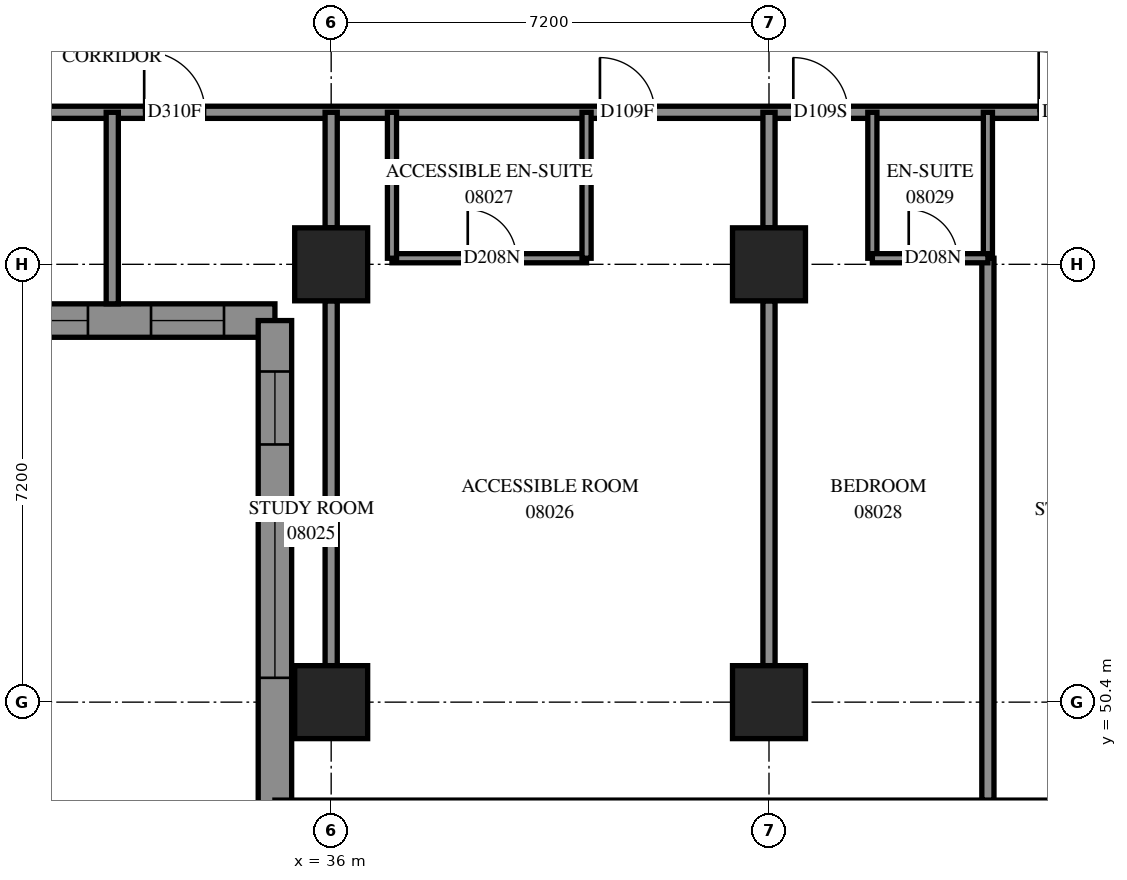
"""IFC4 building model, lengths in metres.
Left out: names, types, materials, properties, quantities, classifications, styles, units other than length and angle.
Written with IfcOpenShell. Run it as: python <this file> out.ifc"""

import sys

from ifc_helpers import new_model, si_unit, direction, frame, frame_2d, origin, origin_2d, place, context, subcontext, project, spatial, polyline, rectangle, outline, extrude, element, fill, save


model = new_model("IFC4")
c1 = context("Model", 3, precision=1e-05, world=origin(), true_north=direction((0.0, 1.0)))
c2 = subcontext(c1, "Body", "Model", "MODEL_VIEW")
j1 = project(units=[si_unit("LENGTHUNIT", "METRE"), si_unit("PLANEANGLEUNIT", "RADIAN")], contexts=[c1])
p1 = place(None, origin())
s1 = spatial("IfcSite", under=j1, at=p1, CompositionType="ELEMENT")
p2 = place(p1, origin())
s2 = spatial("IfcBuilding", under=s1, at=p2, CompositionType="ELEMENT")
p3 = place(p2, frame((0.0, 0.0, 33.8)))
s3 = spatial("IfcBuildingStorey", under=s2, at=p3, CompositionType="ELEMENT", Elevation=33.8)
for number, where, z_axis, x_axis in (
    (1, (36.0, 50.4, 0.0), (0.0, 0.0, 1.0), (1.0, 0.0, 0.0)),
    (2, (36.0, 57.6, 0.0), (0.0, 0.0, 1.0), (1.0, 0.0, 0.0)),
    (3, (43.2, 50.4, 0.0), (0.0, 0.0, 1.0), (1.0, 0.0, 0.0)),
    (4, (43.2, 57.6, 0.0), (0.0, 0.0, 1.0), (1.0, 0.0, 0.0)),
):
    element("IfcColumn", number, at=place(p3, frame(where, z_axis=z_axis, x_axis=x_axis)), inside=s3, PredefinedType="COLUMN", context=c2, shape_type="SweptSolid", body=[
        extrude(rectangle(XDim=1.2, YDim=1.2, at=origin_2d()), origin(), (0.0, 0.0, 1.0), 3.1),
    ])
p4 = place(p3, frame((27.875, 56.675, 0.0), z_axis=(0.0, 0.0, 1.0), x_axis=(1.0, 0.0, 0.0)))
e5 = element("IfcWall", 5, at=p4, inside=s3, PredefinedType="SOLIDWALL", context=c2, shape_type="SweptSolid", body=[
    extrude(outline(polyline([(-0.275, -0.275), (6.925, -0.275), (7.475, 0.275), (0.275, 0.275), (-0.275, -0.275)])), origin(), (0.0, 0.0, 1.0), 3.1),
])
p5 = place(p4, frame((1.325, 0.0, 0.5)))
e6 = element("IfcOpeningElement", 6, at=p5, cuts=e5, PredefinedType="OPENING", context=c2, shape_type="SweptSolid", body=[
    extrude(rectangle(XDim=2.8, YDim=2.45, at=frame_2d((1.4, 1.225))), frame((0.0, 0.285, 0.0), z_axis=(0.0, -1.0, 0.0), x_axis=(1.0, 0.0, 0.0)), (0.0, 0.0, 1.0), 0.57),
])
p6 = place(p4, frame((5.162, 0.0, 0.5)))
e7 = element("IfcOpeningElement", 7, at=p6, cuts=e5, PredefinedType="OPENING", context=c2, shape_type="SweptSolid", body=[
    extrude(rectangle(XDim=1.2, YDim=2.45, at=frame_2d((0.6, 1.225))), frame((0.0, 0.285, 0.0), z_axis=(0.0, -1.0, 0.0), x_axis=(1.0, 0.0, 0.0)), (0.0, 0.0, 1.0), 0.57),
])
p7 = place(p3, frame((35.075, 56.675, 0.0), z_axis=(0.0, 0.0, 1.0), x_axis=(0.0, -1.0, 0.0)))
e8 = element("IfcWall", 8, at=p7, inside=s3, PredefinedType="SOLIDWALL", context=c2, shape_type="SweptSolid", body=[
    extrude(outline(polyline([(0.275, -0.275), (8.436, -0.275), (7.886, 0.275), (-0.275, 0.275), (0.275, -0.275)])), origin(), (0.0, 0.0, 1.0), 3.1),
])
p8 = place(p7, frame((3.075, 0.0, 0.5)))
e9 = element("IfcOpeningElement", 9, at=p8, cuts=e8, PredefinedType="OPENING", context=c2, shape_type="SweptSolid", body=[
    extrude(rectangle(XDim=2.8, YDim=2.45, at=frame_2d((1.4, 1.225))), frame((0.0, 0.285, 0.0), z_axis=(0.0, -1.0, 0.0), x_axis=(1.0, 0.0, 0.0)), (0.0, 0.0, 1.0), 0.57),
])
p9 = place(p7, frame((0.838, 0.0, 0.5)))
e10 = element("IfcOpeningElement", 10, at=p9, cuts=e8, PredefinedType="OPENING", context=c2, shape_type="SweptSolid", body=[
    extrude(rectangle(XDim=1.2, YDim=2.45, at=frame_2d((0.6, 1.225))), frame((0.0, 0.285, 0.0), z_axis=(0.0, -1.0, 0.0), x_axis=(1.0, 0.0, 0.0)), (0.0, 0.0, 1.0), 0.57),
])
p10 = place(p3, frame((35.075, 48.514, 0.0), z_axis=(0.0, 0.0, 1.0), x_axis=(1.0, 0.0, 0.0)))
e11 = element("IfcWall", 11, at=p10, inside=s3, PredefinedType="SOLIDWALL", context=c2, shape_type="SweptSolid", body=[
    extrude(outline(polyline([(-0.275, -0.275), (14.125, -0.275), (14.675, 0.275), (0.275, 0.275), (-0.275, -0.275)])), origin(), (0.0, 0.0, 1.0), 3.1),
])
p11 = place(p10, frame((1.325, 0.0, 0.5)))
e12 = element("IfcOpeningElement", 12, at=p11, cuts=e11, PredefinedType="OPENING", context=c2, shape_type="SweptSolid", body=[
    extrude(rectangle(XDim=2.8, YDim=2.45, at=frame_2d((1.4, 1.225))), frame((0.0, 0.285, 0.0), z_axis=(0.0, -1.0, 0.0), x_axis=(1.0, 0.0, 0.0)), (0.0, 0.0, 1.0), 0.57),
])
p12 = place(p10, frame((4.925, 0.0, 0.5)))
e13 = element("IfcOpeningElement", 13, at=p12, cuts=e11, PredefinedType="OPENING", context=c2, shape_type="SweptSolid", body=[
    extrude(rectangle(XDim=2.8, YDim=2.45, at=frame_2d((1.4, 1.225))), frame((0.0, 0.285, 0.0), z_axis=(0.0, -1.0, 0.0), x_axis=(1.0, 0.0, 0.0)), (0.0, 0.0, 1.0), 0.57),
])
p13 = place(p10, frame((8.275, 0.0, 0.5)))
e14 = element("IfcOpeningElement", 14, at=p13, cuts=e11, PredefinedType="OPENING", context=c2, shape_type="SweptSolid", body=[
    extrude(rectangle(XDim=2.8, YDim=2.45, at=frame_2d((1.4, 1.225))), frame((0.0, 0.285, 0.0), z_axis=(0.0, -1.0, 0.0), x_axis=(1.0, 0.0, 0.0)), (0.0, 0.0, 1.0), 0.57),
])
p14 = place(p10, frame((12.363, 0.0, 0.5)))
e15 = element("IfcOpeningElement", 15, at=p14, cuts=e11, PredefinedType="OPENING", context=c2, shape_type="SweptSolid", body=[
    extrude(rectangle(XDim=1.2, YDim=2.45, at=frame_2d((0.6, 1.225))), frame((0.0, 0.285, 0.0), z_axis=(0.0, -1.0, 0.0), x_axis=(1.0, 0.0, 0.0)), (0.0, 0.0, 1.0), 0.57),
])
p15 = place(p3, frame((28.8, 60.1, 0.0), z_axis=(0.0, 0.0, 1.0), x_axis=(1.0, 0.0, 0.0)))
e16 = element("IfcWall", 16, at=p15, inside=s3, PredefinedType="PARTITIONING", context=c2, shape_type="SweptSolid", body=[
    extrude(rectangle(XDim=24.1, YDim=0.2, at=frame_2d((12.05, 0.0))), origin(), (0.0, 0.0, 1.0), 3.1),
])
p16 = place(p15, frame((4.125, 0.0, 0.0)))
e17 = element("IfcOpeningElement", 17, at=p16, cuts=e16, PredefinedType="OPENING", context=c2, shape_type="SweptSolid", body=[
    extrude(rectangle(XDim=1.0, YDim=2.1, at=frame_2d((0.5, 1.05))), frame((0.0, 0.11, 0.0), z_axis=(0.0, -1.0, 0.0), x_axis=(1.0, 0.0, 0.0)), (0.0, 0.0, 1.0), 0.22),
])
p17 = place(p15, frame((11.62, 0.0, 0.0)))
e18 = element("IfcOpeningElement", 18, at=p17, cuts=e16, PredefinedType="OPENING", context=c2, shape_type="SweptSolid", body=[
    extrude(rectangle(XDim=0.9, YDim=2.1, at=frame_2d((0.45, 1.05))), frame((0.0, 0.11, 0.0), z_axis=(0.0, -1.0, 0.0), x_axis=(1.0, 0.0, 0.0)), (0.0, 0.0, 1.0), 0.22),
])
p18 = place(p15, frame((14.8, 0.0, 0.0)))
e19 = element("IfcOpeningElement", 19, at=p18, cuts=e16, PredefinedType="OPENING", context=c2, shape_type="SweptSolid", body=[
    extrude(rectangle(XDim=0.9, YDim=2.1, at=frame_2d((0.45, 1.05))), frame((0.0, 0.11, 0.0), z_axis=(0.0, -1.0, 0.0), x_axis=(1.0, 0.0, 0.0)), (0.0, 0.0, 1.0), 0.22),
])
p19 = place(p15, frame((18.835, 0.0, 0.0)))
e20 = element("IfcOpeningElement", 20, at=p19, cuts=e16, PredefinedType="OPENING", context=c2, shape_type="SweptSolid", body=[
    extrude(rectangle(XDim=1.0, YDim=2.1, at=frame_2d((0.5, 1.05))), frame((0.0, 0.11, 0.0), z_axis=(0.0, -1.0, 0.0), x_axis=(1.0, 0.0, 0.0)), (0.0, 0.0, 1.0), 0.22),
])
p20 = place(p15, frame((22.854, 0.0, 0.0)))
e21 = element("IfcOpeningElement", 21, at=p20, cuts=e16, PredefinedType="OPENING", context=c2, shape_type="SweptSolid", body=[
    extrude(rectangle(XDim=1.0, YDim=2.1, at=frame_2d((0.5, 1.05))), frame((0.0, 0.11, 0.0), z_axis=(0.0, -1.0, 0.0), x_axis=(1.0, 0.0, 0.0)), (0.0, 0.0, 1.0), 0.22),
])
p21 = place(p3, frame((46.8, 48.789, 0.0), z_axis=(0.0, 0.0, 1.0), x_axis=(0.0, 1.0, 0.0)))
e22 = element("IfcWall", 22, at=p21, inside=s3, PredefinedType="PARTITIONING", context=c2, shape_type="SweptSolid", body=[
    extrude(rectangle(XDim=8.911, YDim=0.2, at=frame_2d((4.455, 0.0))), origin(), (0.0, 0.0, 1.0), 3.1),
])
p22 = place(p3, frame((36.0, 51.0, 0.0), z_axis=(0.0, 0.0, 1.0), x_axis=(0.0, 1.0, 0.0)))
e23 = element("IfcWall", 23, at=p22, inside=s3, PredefinedType="PARTITIONING", context=c2, shape_type="SweptSolid", body=[
    extrude(rectangle(XDim=6.0, YDim=0.2, at=frame_2d((3.0, 0.0))), origin(), (0.0, 0.0, 1.0), 2.6),
])
p23 = place(p3, frame((43.2, 51.0, 0.0), z_axis=(0.0, 0.0, 1.0), x_axis=(0.0, 1.0, 0.0)))
e24 = element("IfcWall", 24, at=p23, inside=s3, PredefinedType="PARTITIONING", context=c2, shape_type="SweptSolid", body=[
    extrude(rectangle(XDim=6.0, YDim=0.2, at=frame_2d((3.0, 0.0))), origin(), (0.0, 0.0, 1.0), 3.1),
])
p24 = place(p3, frame((37.0, 57.7, 0.0), z_axis=(0.0, 0.0, 1.0), x_axis=(1.0, 0.0, 0.0)))
e25 = element("IfcWall", 25, at=p24, inside=s3, PredefinedType="PARTITIONING", context=c2, shape_type="SweptSolid", body=[
    extrude(rectangle(XDim=3.2, YDim=0.15, at=frame_2d((1.6, 0.0))), origin(), (0.0, 0.0, 1.0), 3.1),
])
p25 = place(p24, frame((1.246, 0.0, 0.0)))
e26 = element("IfcOpeningElement", 26, at=p25, cuts=e25, PredefinedType="OPENING", context=c2, shape_type="SweptSolid", body=[
    extrude(rectangle(XDim=0.8, YDim=2.1, at=frame_2d((0.4, 1.05))), frame((0.0, 0.085, 0.0), z_axis=(0.0, -1.0, 0.0), x_axis=(1.0, 0.0, 0.0)), (0.0, 0.0, 1.0), 0.17),
])
p26 = place(p3, frame((32.4, 56.95, 0.0), z_axis=(0.0, 0.0, 1.0), x_axis=(0.0, 1.0, 0.0)))
e27 = element("IfcWall", 27, at=p26, inside=s3, PredefinedType="PARTITIONING", context=c2, shape_type="SweptSolid", body=[
    extrude(rectangle(XDim=3.15, YDim=0.2, at=frame_2d((1.575, 0.0))), origin(), (0.0, 0.0, 1.0), 3.1),
])
for number, where, z_axis, x_axis in (
    (28, (40.2, 57.7, 0.0), (0.0, 0.0, 1.0), (0.0, 1.0, 0.0)),
    (29, (37.0, 57.7, 0.0), (0.0, 0.0, 1.0), (0.0, 1.0, 0.0)),
    (30, (44.9, 57.7, 0.0), (0.0, 0.0, 1.0), (0.0, 1.0, 0.0)),
    (31, (46.8, 57.7, 0.0), (0.0, 0.0, 1.0), (0.0, 1.0, 0.0)),
):
    element("IfcWall", number, at=place(p3, frame(where, z_axis=z_axis, x_axis=x_axis)), inside=s3, PredefinedType="PARTITIONING", context=c2, shape_type="SweptSolid", body=[
        extrude(rectangle(XDim=2.4, YDim=0.15, at=frame_2d((1.2, 0.0))), origin(), (0.0, 0.0, 1.0), 3.1),
    ])
p27 = place(p3, frame((36.0, 58.2, 0.0), z_axis=(0.0, 0.0, 1.0), x_axis=(0.0, 1.0, 0.0)))
e32 = element("IfcWall", 32, at=p27, inside=s3, PredefinedType="PARTITIONING", context=c2, shape_type="SweptSolid", body=[
    extrude(rectangle(XDim=1.9, YDim=0.2, at=frame_2d((0.95, 0.0))), origin(), (0.0, 0.0, 1.0), 3.1),
])
p28 = place(p3, frame((44.9, 57.7, 0.0), z_axis=(0.0, 0.0, 1.0), x_axis=(1.0, 0.0, 0.0)))
e33 = element("IfcWall", 33, at=p28, inside=s3, PredefinedType="PARTITIONING", context=c2, shape_type="SweptSolid", body=[
    extrude(rectangle(XDim=1.9, YDim=0.15, at=frame_2d((0.95, 0.0))), origin(), (0.0, 0.0, 1.0), 3.1),
])
p29 = place(p28, frame((0.598, 0.0, 0.0)))
e34 = element("IfcOpeningElement", 34, at=p29, cuts=e33, PredefinedType="OPENING", context=c2, shape_type="SweptSolid", body=[
    extrude(rectangle(XDim=0.8, YDim=2.1, at=frame_2d((0.4, 1.05))), frame((0.0, 0.085, 0.0), z_axis=(0.0, -1.0, 0.0), x_axis=(1.0, 0.0, 0.0)), (0.0, 0.0, 1.0), 0.17),
])
p30 = place(p3, frame((43.2, 58.2, 0.0), z_axis=(0.0, 0.0, 1.0), x_axis=(0.0, 1.0, 0.0)))
e35 = element("IfcWall", 35, at=p30, inside=s3, PredefinedType="PARTITIONING", context=c2, shape_type="SweptSolid", body=[
    extrude(rectangle(XDim=1.9, YDim=0.2, at=frame_2d((0.95, 0.0))), origin(), (0.0, 0.0, 1.0), 3.1),
])
p31 = place(p5, origin())
e36 = element("IfcWindow", 36, at=p31, inside=s3, PartitioningType="SINGLE_PANEL", PredefinedType="WINDOW", context=c2, shape_type="SweptSolid", body=[
    extrude(rectangle(XDim=2.8, YDim=2.45, at=frame_2d((1.4, 1.225))), frame((0.0, 0.155, 0.0), z_axis=(0.0, -1.0, 0.0), x_axis=(1.0, 0.0, 0.0)), (0.0, 0.0, 1.0), 0.06),
])
fill(e6, e36)
p32 = place(p6, origin())
e37 = element("IfcWindow", 37, at=p32, inside=s3, PartitioningType="SINGLE_PANEL", PredefinedType="WINDOW", context=c2, shape_type="SweptSolid", body=[
    extrude(rectangle(XDim=1.2, YDim=2.45, at=frame_2d((0.6, 1.225))), frame((0.0, 0.155, 0.0), z_axis=(0.0, -1.0, 0.0), x_axis=(1.0, 0.0, 0.0)), (0.0, 0.0, 1.0), 0.06),
])
fill(e7, e37)
p33 = place(p8, origin())
e38 = element("IfcWindow", 38, at=p33, inside=s3, PartitioningType="SINGLE_PANEL", PredefinedType="WINDOW", context=c2, shape_type="SweptSolid", body=[
    extrude(rectangle(XDim=2.8, YDim=2.45, at=frame_2d((1.4, 1.225))), frame((0.0, 0.155, 0.0), z_axis=(0.0, -1.0, 0.0), x_axis=(1.0, 0.0, 0.0)), (0.0, 0.0, 1.0), 0.06),
])
fill(e9, e38)
p34 = place(p9, origin())
e39 = element("IfcWindow", 39, at=p34, inside=s3, PartitioningType="SINGLE_PANEL", PredefinedType="WINDOW", context=c2, shape_type="SweptSolid", body=[
    extrude(rectangle(XDim=1.2, YDim=2.45, at=frame_2d((0.6, 1.225))), frame((0.0, 0.155, 0.0), z_axis=(0.0, -1.0, 0.0), x_axis=(1.0, 0.0, 0.0)), (0.0, 0.0, 1.0), 0.06),
])
fill(e10, e39)
p35 = place(p16, origin())
e40 = element("IfcDoor", 40, at=p35, inside=s3, OperationType="SINGLE_SWING_RIGHT", PredefinedType="DOOR", context=c2, shape_type="SweptSolid", body=[
    extrude(rectangle(XDim=1.0, YDim=2.1, at=frame_2d((0.5, 1.05))), frame((0.0, 0.025, 0.0), z_axis=(0.0, -1.0, 0.0), x_axis=(1.0, 0.0, 0.0)), (0.0, 0.0, 1.0), 0.05),
])
fill(e17, e40)
p36 = place(p17, origin())
e41 = element("IfcDoor", 41, at=p36, inside=s3, OperationType="SINGLE_SWING_LEFT", PredefinedType="DOOR", context=c2, shape_type="SweptSolid", body=[
    extrude(rectangle(XDim=0.9, YDim=2.1, at=frame_2d((0.45, 1.05))), frame((0.0, 0.025, 0.0), z_axis=(0.0, -1.0, 0.0), x_axis=(1.0, 0.0, 0.0)), (0.0, 0.0, 1.0), 0.05),
])
fill(e18, e41)
p37 = place(p25, origin())
e42 = element("IfcDoor", 42, at=p37, inside=s3, OperationType="SINGLE_SWING_RIGHT", PredefinedType="DOOR", context=c2, shape_type="SweptSolid", body=[
    extrude(rectangle(XDim=0.8, YDim=2.1, at=frame_2d((0.4, 1.05))), frame((0.0, 0.025, 0.0), z_axis=(0.0, -1.0, 0.0), x_axis=(1.0, 0.0, 0.0)), (0.0, 0.0, 1.0), 0.05),
])
fill(e26, e42)
p38 = place(p18, origin())
e43 = element("IfcDoor", 43, at=p38, inside=s3, OperationType="SINGLE_SWING_LEFT", PredefinedType="DOOR", context=c2, shape_type="SweptSolid", body=[
    extrude(rectangle(XDim=0.9, YDim=2.1, at=frame_2d((0.45, 1.05))), frame((0.0, 0.025, 0.0), z_axis=(0.0, -1.0, 0.0), x_axis=(1.0, 0.0, 0.0)), (0.0, 0.0, 1.0), 0.05),
])
fill(e19, e43)
p39 = place(p29, origin())
e44 = element("IfcDoor", 44, at=p39, inside=s3, OperationType="SINGLE_SWING_RIGHT", PredefinedType="DOOR", context=c2, shape_type="SweptSolid", body=[
    extrude(rectangle(XDim=0.8, YDim=2.1, at=frame_2d((0.4, 1.05))), frame((0.0, 0.025, 0.0), z_axis=(0.0, -1.0, 0.0), x_axis=(1.0, 0.0, 0.0)), (0.0, 0.0, 1.0), 0.05),
])
fill(e34, e44)
p40 = place(p19, origin())
e45 = element("IfcDoor", 45, at=p40, inside=s3, OperationType="SINGLE_SWING_RIGHT", PredefinedType="DOOR", context=c2, shape_type="SweptSolid", body=[
    extrude(rectangle(XDim=1.0, YDim=2.1, at=frame_2d((0.5, 1.05))), frame((0.0, 0.025, 0.0), z_axis=(0.0, -1.0, 0.0), x_axis=(1.0, 0.0, 0.0)), (0.0, 0.0, 1.0), 0.05),
])
fill(e20, e45)
save(model, sys.argv[1])
